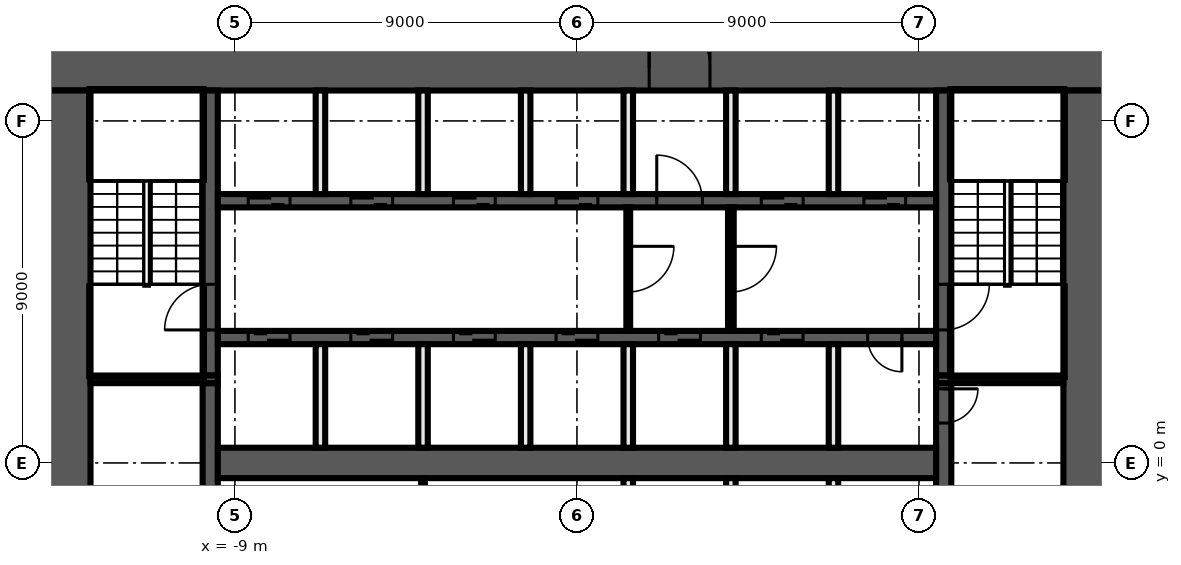
"""IFC4 building model, lengths in metres.
Left out: names, types, materials, properties, quantities, classifications, styles, units other than length and angle.
Written with IfcOpenShell. Run it as: python <this file> out.ifc"""

import sys

from ifc_helpers import new_model, si_unit, direction, frame, frame_2d, origin, place, context, subcontext, project, spatial, rectangle, extrude, element, fill, save


model = new_model("IFC4")
c1 = context("Model", 3, precision=1e-05, world=origin(), true_north=direction((0.0, 1.0)))
c2 = subcontext(c1, "Body", "Model", "MODEL_VIEW")
j1 = project(units=[si_unit("LENGTHUNIT", "METRE"), si_unit("PLANEANGLEUNIT", "RADIAN")], contexts=[c1])
p1 = place(None, origin())
s1 = spatial("IfcSite", under=j1, at=p1, CompositionType="ELEMENT")
p2 = place(p1, origin())
s2 = spatial("IfcBuilding", under=s1, at=p2, CompositionType="ELEMENT")
p3 = place(p2, frame((0.0, 0.0, 89.2)))
s3 = spatial("IfcBuildingStorey", under=s2, at=p3, CompositionType="ELEMENT", Elevation=89.2)
p4 = place(p3, frame((-14.0, 10.4, 0.0), z_axis=(0.0, 0.0, 1.0), x_axis=(1.0, 0.0, 0.0)))
e1 = element("IfcWall", 1, at=p4, inside=s3, PredefinedType="SHEAR", context=c2, shape_type="SweptSolid", body=[
    extrude(rectangle(XDim=28.0, YDim=1.2, at=frame_2d((14.0, 0.0))), origin(), (0.0, 0.0, 1.0), 5.55),
])
p5 = place(p4, frame((15.9, 0.0, 0.0)))
e2 = element("IfcOpeningElement", 2, at=p5, cuts=e1, PredefinedType="OPENING", context=c2, shape_type="SweptSolid", body=[
    extrude(rectangle(XDim=1.6, YDim=2.1, at=frame_2d((0.8, 1.05))), frame((0.0, 0.61, 0.0), z_axis=(0.0, -1.0, 0.0), x_axis=(1.0, 0.0, 0.0)), (0.0, 0.0, 1.0), 1.22),
])
for number, where, z_axis, x_axis in (
    (3, (13.4, 9.8, 0.0), (0.0, 0.0, 1.0), (0.0, -1.0, 0.0)),
    (4, (-13.4, -9.8, 0.0), (0.0, 0.0, 1.0), (0.0, 1.0, 0.0)),
):
    element("IfcWall", number, at=place(p3, frame(where, z_axis=z_axis, x_axis=x_axis)), inside=s3, PredefinedType="SHEAR", context=c2, shape_type="SweptSolid", body=[
        extrude(rectangle(XDim=19.6, YDim=1.2, at=frame_2d((9.8, 0.0))), origin(), (0.0, 0.0, 1.0), 5.55),
    ])
p6 = place(p3, frame((9.65, 2.1, 0.0), z_axis=(0.0, 0.0, 1.0), x_axis=(0.0, -1.0, 0.0)))
e5 = element("IfcWall", 5, at=p6, inside=s3, PredefinedType="SHEAR", context=c2, shape_type="SweptSolid", body=[
    extrude(rectangle(XDim=4.2, YDim=0.4, at=frame_2d((2.1, 0.0))), origin(), (0.0, 0.0, 1.0), 5.55),
])
p7 = place(p6, frame((0.15, 0.0, 0.0)))
e6 = element("IfcOpeningElement", 6, at=p7, cuts=e5, PredefinedType="OPENING", context=c2, shape_type="SweptSolid", body=[
    extrude(rectangle(XDim=0.9, YDim=2.1, at=frame_2d((0.45, 1.05))), frame((0.0, 0.21, 0.0), z_axis=(0.0, -1.0, 0.0), x_axis=(1.0, 0.0, 0.0)), (0.0, 0.0, 1.0), 0.42),
])
p8 = place(p3, frame((9.65, 9.8, 0.0), z_axis=(0.0, 0.0, 1.0), x_axis=(0.0, -1.0, 0.0)))
e7 = element("IfcWall", 7, at=p8, inside=s3, PredefinedType="SHEAR", context=c2, shape_type="SweptSolid", body=[
    extrude(rectangle(XDim=7.5, YDim=0.4, at=frame_2d((3.75, 0.0))), origin(), (0.0, 0.0, 1.0), 5.55),
])
p9 = place(p8, frame((5.1, 0.0, 0.0)))
e8 = element("IfcOpeningElement", 8, at=p9, cuts=e7, PredefinedType="OPENING", context=c2, shape_type="SweptSolid", body=[
    extrude(rectangle(XDim=1.2, YDim=2.1, at=frame_2d((0.6, 1.05))), frame((0.0, 0.21, 0.0), z_axis=(0.0, -1.0, 0.0), x_axis=(1.0, 0.0, 0.0)), (0.0, 0.0, 1.0), 0.42),
])
p10 = place(p3, frame((-9.65, -2.1, 0.0), z_axis=(0.0, 0.0, 1.0), x_axis=(0.0, 1.0, 0.0)))
e9 = element("IfcWall", 9, at=p10, inside=s3, PredefinedType="SHEAR", context=c2, shape_type="SweptSolid", body=[
    extrude(rectangle(XDim=4.2, YDim=0.4, at=frame_2d((2.1, 0.0))), origin(), (0.0, 0.0, 1.0), 5.55),
])
p11 = place(p3, frame((-9.65, 2.3, 0.0), z_axis=(0.0, 0.0, 1.0), x_axis=(0.0, 1.0, 0.0)))
e10 = element("IfcWall", 10, at=p11, inside=s3, PredefinedType="SHEAR", context=c2, shape_type="SweptSolid", body=[
    extrude(rectangle(XDim=7.5, YDim=0.4, at=frame_2d((3.75, 0.0))), origin(), (0.0, 0.0, 1.0), 5.55),
])
p12 = place(p11, frame((1.2, 0.0, 0.0)))
e11 = element("IfcOpeningElement", 11, at=p12, cuts=e10, PredefinedType="OPENING", context=c2, shape_type="SweptSolid", body=[
    extrude(rectangle(XDim=1.2, YDim=2.1, at=frame_2d((0.6, 1.05))), frame((0.0, 0.21, 0.0), z_axis=(0.0, -1.0, 0.0), x_axis=(1.0, 0.0, 0.0)), (0.0, 0.0, 1.0), 0.42),
])
for number, where, z_axis, x_axis in (
    (12, (9.45, 2.2, 0.0), (0.0, 0.0, 1.0), (1.0, 0.0, 0.0)),
    (13, (-9.45, 2.2, 0.0), (0.0, 0.0, 1.0), (-1.0, 0.0, 0.0)),
):
    element("IfcWall", number, at=place(p3, frame(where, z_axis=z_axis, x_axis=x_axis)), inside=s3, PredefinedType="SHEAR", context=c2, shape_type="SweptSolid", body=[
        extrude(rectangle(XDim=3.35, YDim=0.2, at=frame_2d((1.675, 0.0))), origin(), (0.0, 0.0, 1.0), 5.55),
    ])
p13 = place(p3, frame((-9.45, 6.9, 0.0), z_axis=(0.0, 0.0, 1.0), x_axis=(1.0, 0.0, 0.0)))
e14 = element("IfcWall", 14, at=p13, inside=s3, PredefinedType="SHEAR", context=c2, shape_type="SweptSolid", body=[
    extrude(rectangle(XDim=18.9, YDim=0.35, at=frame_2d((9.45, 0.0))), origin(), (0.0, 0.0, 1.0), 5.55),
])
p14 = place(p13, frame((0.8, 0.0, 0.0)))
e15 = element("IfcOpeningElement", 15, at=p14, cuts=e14, PredefinedType="OPENING", context=c2, shape_type="SweptSolid", body=[
    extrude(rectangle(XDim=1.1, YDim=2.1, at=frame_2d((0.55, 1.05))), frame((0.0, 0.185, 0.0), z_axis=(0.0, -1.0, 0.0), x_axis=(1.0, 0.0, 0.0)), (0.0, 0.0, 1.0), 0.37),
])
p15 = place(p13, frame((3.5, 0.0, 0.0)))
e16 = element("IfcOpeningElement", 16, at=p15, cuts=e14, PredefinedType="OPENING", context=c2, shape_type="SweptSolid", body=[
    extrude(rectangle(XDim=1.1, YDim=2.1, at=frame_2d((0.55, 1.05))), frame((0.0, 0.185, 0.0), z_axis=(0.0, -1.0, 0.0), x_axis=(1.0, 0.0, 0.0)), (0.0, 0.0, 1.0), 0.37),
])
p16 = place(p13, frame((6.2, 0.0, 0.0)))
e17 = element("IfcOpeningElement", 17, at=p16, cuts=e14, PredefinedType="OPENING", context=c2, shape_type="SweptSolid", body=[
    extrude(rectangle(XDim=1.1, YDim=2.1, at=frame_2d((0.55, 1.05))), frame((0.0, 0.185, 0.0), z_axis=(0.0, -1.0, 0.0), x_axis=(1.0, 0.0, 0.0)), (0.0, 0.0, 1.0), 0.37),
])
p17 = place(p13, frame((8.9, 0.0, 0.0)))
e18 = element("IfcOpeningElement", 18, at=p17, cuts=e14, PredefinedType="OPENING", context=c2, shape_type="SweptSolid", body=[
    extrude(rectangle(XDim=1.1, YDim=2.1, at=frame_2d((0.55, 1.05))), frame((0.0, 0.185, 0.0), z_axis=(0.0, -1.0, 0.0), x_axis=(1.0, 0.0, 0.0)), (0.0, 0.0, 1.0), 0.37),
])
p18 = place(p13, frame((11.55, 0.0, 0.0)))
e19 = element("IfcOpeningElement", 19, at=p18, cuts=e14, PredefinedType="OPENING", context=c2, shape_type="SweptSolid", body=[
    extrude(rectangle(XDim=1.2, YDim=2.1, at=frame_2d((0.6, 1.05))), frame((0.0, 0.185, 0.0), z_axis=(0.0, -1.0, 0.0), x_axis=(1.0, 0.0, 0.0)), (0.0, 0.0, 1.0), 0.37),
])
p19 = place(p13, frame((14.3, 0.0, 0.0)))
e20 = element("IfcOpeningElement", 20, at=p19, cuts=e14, PredefinedType="OPENING", context=c2, shape_type="SweptSolid", body=[
    extrude(rectangle(XDim=1.1, YDim=2.1, at=frame_2d((0.55, 1.05))), frame((0.0, 0.185, 0.0), z_axis=(0.0, -1.0, 0.0), x_axis=(1.0, 0.0, 0.0)), (0.0, 0.0, 1.0), 0.37),
])
p20 = place(p13, frame((17.0, 0.0, 0.0)))
e21 = element("IfcOpeningElement", 21, at=p20, cuts=e14, PredefinedType="OPENING", context=c2, shape_type="SweptSolid", body=[
    extrude(rectangle(XDim=1.1, YDim=2.1, at=frame_2d((0.55, 1.05))), frame((0.0, 0.185, 0.0), z_axis=(0.0, -1.0, 0.0), x_axis=(1.0, 0.0, 0.0)), (0.0, 0.0, 1.0), 0.37),
])
p21 = place(p3, frame((9.45, 3.3, 0.0), z_axis=(0.0, 0.0, 1.0), x_axis=(-1.0, 0.0, 0.0)))
e22 = element("IfcWall", 22, at=p21, inside=s3, PredefinedType="SHEAR", context=c2, shape_type="SweptSolid", body=[
    extrude(rectangle(XDim=18.9, YDim=0.35, at=frame_2d((9.45, 0.0))), origin(), (0.0, 0.0, 1.0), 5.55),
])
p22 = place(p21, frame((17.0, 0.0, 0.0)))
e23 = element("IfcOpeningElement", 23, at=p22, cuts=e22, PredefinedType="OPENING", context=c2, shape_type="SweptSolid", body=[
    extrude(rectangle(XDim=1.1, YDim=2.1, at=frame_2d((0.55, 1.05))), frame((0.0, 0.185, 0.0), z_axis=(0.0, -1.0, 0.0), x_axis=(1.0, 0.0, 0.0)), (0.0, 0.0, 1.0), 0.37),
])
p23 = place(p21, frame((14.3, 0.0, 0.0)))
e24 = element("IfcOpeningElement", 24, at=p23, cuts=e22, PredefinedType="OPENING", context=c2, shape_type="SweptSolid", body=[
    extrude(rectangle(XDim=1.1, YDim=2.1, at=frame_2d((0.55, 1.05))), frame((0.0, 0.185, 0.0), z_axis=(0.0, -1.0, 0.0), x_axis=(1.0, 0.0, 0.0)), (0.0, 0.0, 1.0), 0.37),
])
p24 = place(p21, frame((11.6, 0.0, 0.0)))
e25 = element("IfcOpeningElement", 25, at=p24, cuts=e22, PredefinedType="OPENING", context=c2, shape_type="SweptSolid", body=[
    extrude(rectangle(XDim=1.1, YDim=2.1, at=frame_2d((0.55, 1.05))), frame((0.0, 0.185, 0.0), z_axis=(0.0, -1.0, 0.0), x_axis=(1.0, 0.0, 0.0)), (0.0, 0.0, 1.0), 0.37),
])
p25 = place(p21, frame((8.9, 0.0, 0.0)))
e26 = element("IfcOpeningElement", 26, at=p25, cuts=e22, PredefinedType="OPENING", context=c2, shape_type="SweptSolid", body=[
    extrude(rectangle(XDim=1.1, YDim=2.1, at=frame_2d((0.55, 1.05))), frame((0.0, 0.185, 0.0), z_axis=(0.0, -1.0, 0.0), x_axis=(1.0, 0.0, 0.0)), (0.0, 0.0, 1.0), 0.37),
])
p26 = place(p21, frame((6.2, 0.0, 0.0)))
e27 = element("IfcOpeningElement", 27, at=p26, cuts=e22, PredefinedType="OPENING", context=c2, shape_type="SweptSolid", body=[
    extrude(rectangle(XDim=1.1, YDim=2.1, at=frame_2d((0.55, 1.05))), frame((0.0, 0.185, 0.0), z_axis=(0.0, -1.0, 0.0), x_axis=(1.0, 0.0, 0.0)), (0.0, 0.0, 1.0), 0.37),
])
p27 = place(p21, frame((3.5, 0.0, 0.0)))
e28 = element("IfcOpeningElement", 28, at=p27, cuts=e22, PredefinedType="OPENING", context=c2, shape_type="SweptSolid", body=[
    extrude(rectangle(XDim=1.1, YDim=2.1, at=frame_2d((0.55, 1.05))), frame((0.0, 0.185, 0.0), z_axis=(0.0, -1.0, 0.0), x_axis=(1.0, 0.0, 0.0)), (0.0, 0.0, 1.0), 0.37),
])
p28 = place(p21, frame((0.9, 0.0, 0.0)))
e29 = element("IfcOpeningElement", 29, at=p28, cuts=e22, PredefinedType="OPENING", context=c2, shape_type="SweptSolid", body=[
    extrude(rectangle(XDim=0.9, YDim=2.1, at=frame_2d((0.45, 1.05))), frame((0.0, 0.185, 0.0), z_axis=(0.0, -1.0, 0.0), x_axis=(1.0, 0.0, 0.0)), (0.0, 0.0, 1.0), 0.37),
])
p29 = place(p3, frame((-9.45, 0.0, 0.0), z_axis=(0.0, 0.0, 1.0), x_axis=(1.0, 0.0, 0.0)))
e30 = element("IfcWall", 30, at=p29, inside=s3, PredefinedType="SHEAR", context=c2, shape_type="SweptSolid", body=[
    extrude(rectangle(XDim=18.9, YDim=0.8, at=frame_2d((9.45, 0.0))), origin(), (0.0, 0.0, 1.0), 5.55),
])
for number, where, z_axis, x_axis in (
    (31, (6.75, -3.125, 0.0), (0.0, 0.0, 1.0), (0.0, 1.0, 0.0)),
    (32, (6.75, 0.4, 0.0), (0.0, 0.0, 1.0), (0.0, 1.0, 0.0)),
    (33, (6.75, 7.075, 0.0), (0.0, 0.0, 1.0), (0.0, 1.0, 0.0)),
):
    element("IfcWall", number, at=place(p3, frame(where, z_axis=z_axis, x_axis=x_axis)), inside=s3, PredefinedType="SOLIDWALL", context=c2, shape_type="SweptSolid", body=[
        extrude(rectangle(XDim=2.725, YDim=0.25, at=frame_2d((1.363, 0.0))), origin(), (0.0, 0.0, 1.0), 5.55),
    ])
p30 = place(p3, frame((4.05, 6.725, 0.0), z_axis=(0.0, 0.0, 1.0), x_axis=(0.0, -1.0, 0.0)))
e34 = element("IfcWall", 34, at=p30, inside=s3, PredefinedType="PARTITIONING", context=c2, shape_type="SweptSolid", body=[
    extrude(rectangle(XDim=3.25, YDim=0.15, at=frame_2d((1.625, 0.0))), origin(), (0.0, 0.0, 1.0), 5.55),
])
p31 = place(p30, frame((1.025, 0.0, 0.0)))
e35 = element("IfcOpeningElement", 35, at=p31, cuts=e34, PredefinedType="OPENING", context=c2, shape_type="SweptSolid", body=[
    extrude(rectangle(XDim=1.2, YDim=2.1, at=frame_2d((0.6, 1.05))), frame((0.0, 0.085, 0.0), z_axis=(0.0, -1.0, 0.0), x_axis=(1.0, 0.0, 0.0)), (0.0, 0.0, 1.0), 0.17),
])
for number, where, z_axis, x_axis in (
    (36, (4.05, -3.125, 0.0), (0.0, 0.0, 1.0), (0.0, 1.0, 0.0)),
    (37, (4.05, 0.4, 0.0), (0.0, 0.0, 1.0), (0.0, 1.0, 0.0)),
    (38, (4.05, 7.075, 0.0), (0.0, 0.0, 1.0), (0.0, 1.0, 0.0)),
):
    element("IfcWall", number, at=place(p3, frame(where, z_axis=z_axis, x_axis=x_axis)), inside=s3, PredefinedType="SOLIDWALL", context=c2, shape_type="SweptSolid", body=[
        extrude(rectangle(XDim=2.725, YDim=0.25, at=frame_2d((1.363, 0.0))), origin(), (0.0, 0.0, 1.0), 5.55),
    ])
p32 = place(p3, frame((1.35, 6.725, 0.0), z_axis=(0.0, 0.0, 1.0), x_axis=(0.0, -1.0, 0.0)))
e39 = element("IfcWall", 39, at=p32, inside=s3, PredefinedType="PARTITIONING", context=c2, shape_type="SweptSolid", body=[
    extrude(rectangle(XDim=3.25, YDim=0.1, at=frame_2d((1.625, 0.0))), origin(), (0.0, 0.0, 1.0), 5.55),
])
p33 = place(p32, frame((1.025, 0.0, 0.0)))
e40 = element("IfcOpeningElement", 40, at=p33, cuts=e39, PredefinedType="OPENING", context=c2, shape_type="SweptSolid", body=[
    extrude(rectangle(XDim=1.2, YDim=2.1, at=frame_2d((0.6, 1.05))), frame((0.0, 0.06, 0.0), z_axis=(0.0, -1.0, 0.0), x_axis=(1.0, 0.0, 0.0)), (0.0, 0.0, 1.0), 0.12),
])
for number, where, z_axis, x_axis in (
    (41, (1.35, -3.125, 0.0), (0.0, 0.0, 1.0), (0.0, 1.0, 0.0)),
    (42, (1.35, 0.4, 0.0), (0.0, 0.0, 1.0), (0.0, 1.0, 0.0)),
    (43, (1.35, 7.075, 0.0), (0.0, 0.0, 1.0), (0.0, 1.0, 0.0)),
    (44, (-1.35, 0.4, 0.0), (0.0, 0.0, 1.0), (0.0, 1.0, 0.0)),
    (45, (-1.35, 7.075, 0.0), (0.0, 0.0, 1.0), (0.0, 1.0, 0.0)),
):
    element("IfcWall", number, at=place(p3, frame(where, z_axis=z_axis, x_axis=x_axis)), inside=s3, PredefinedType="SOLIDWALL", context=c2, shape_type="SweptSolid", body=[
        extrude(rectangle(XDim=2.725, YDim=0.25, at=frame_2d((1.363, 0.0))), origin(), (0.0, 0.0, 1.0), 5.55),
    ])
p34 = place(p3, frame((-4.05, -3.125, 0.0), z_axis=(0.0, 0.0, 1.0), x_axis=(0.0, 1.0, 0.0)))
e46 = element("IfcWall", 46, at=p34, inside=s3, PredefinedType="PARTITIONING", context=c2, shape_type="SweptSolid", body=[
    extrude(rectangle(XDim=2.725, YDim=0.1, at=frame_2d((1.363, 0.0))), origin(), (0.0, 0.0, 1.0), 5.55),
])
for number, where, z_axis, x_axis in (
    (47, (-4.05, 0.4, 0.0), (0.0, 0.0, 1.0), (0.0, 1.0, 0.0)),
    (48, (-4.05, 7.075, 0.0), (0.0, 0.0, 1.0), (0.0, 1.0, 0.0)),
    (49, (-6.75, 0.4, 0.0), (0.0, 0.0, 1.0), (0.0, 1.0, 0.0)),
    (50, (-6.75, 7.075, 0.0), (0.0, 0.0, 1.0), (0.0, 1.0, 0.0)),
):
    element("IfcWall", number, at=place(p3, frame(where, z_axis=z_axis, x_axis=x_axis)), inside=s3, PredefinedType="SOLIDWALL", context=c2, shape_type="SweptSolid", body=[
        extrude(rectangle(XDim=2.725, YDim=0.25, at=frame_2d((1.363, 0.0))), origin(), (0.0, 0.0, 1.0), 5.55),
    ])
p35 = place(p7, origin())
e51 = element("IfcDoor", 51, at=p35, inside=s3, OperationType="SINGLE_SWING_RIGHT", PredefinedType="DOOR", context=c2, shape_type="SweptSolid", body=[
    extrude(rectangle(XDim=0.9, YDim=2.1, at=frame_2d((0.45, 1.05))), frame((0.0, 0.025, 0.0), z_axis=(0.0, -1.0, 0.0), x_axis=(1.0, 0.0, 0.0)), (0.0, 0.0, 1.0), 0.05),
])
fill(e6, e51)
p36 = place(p14, origin())
e52 = element("IfcDoor", 52, at=p36, inside=s3, OperationType="DOUBLE_DOOR_SLIDING", PredefinedType="DOOR", context=c2, shape_type="SweptSolid", body=[
    extrude(rectangle(XDim=1.1, YDim=2.1, at=frame_2d((0.55, 1.05))), frame((0.0, 0.025, 0.0), z_axis=(0.0, -1.0, 0.0), x_axis=(1.0, 0.0, 0.0)), (0.0, 0.0, 1.0), 0.05),
])
fill(e15, e52)
p37 = place(p15, origin())
e53 = element("IfcDoor", 53, at=p37, inside=s3, OperationType="DOUBLE_DOOR_SLIDING", PredefinedType="DOOR", context=c2, shape_type="SweptSolid", body=[
    extrude(rectangle(XDim=1.1, YDim=2.1, at=frame_2d((0.55, 1.05))), frame((0.0, 0.025, 0.0), z_axis=(0.0, -1.0, 0.0), x_axis=(1.0, 0.0, 0.0)), (0.0, 0.0, 1.0), 0.05),
])
fill(e16, e53)
p38 = place(p16, origin())
e54 = element("IfcDoor", 54, at=p38, inside=s3, OperationType="DOUBLE_DOOR_SLIDING", PredefinedType="DOOR", context=c2, shape_type="SweptSolid", body=[
    extrude(rectangle(XDim=1.1, YDim=2.1, at=frame_2d((0.55, 1.05))), frame((0.0, 0.025, 0.0), z_axis=(0.0, -1.0, 0.0), x_axis=(1.0, 0.0, 0.0)), (0.0, 0.0, 1.0), 0.05),
])
fill(e17, e54)
p39 = place(p17, origin())
e55 = element("IfcDoor", 55, at=p39, inside=s3, OperationType="DOUBLE_DOOR_SLIDING", PredefinedType="DOOR", context=c2, shape_type="SweptSolid", body=[
    extrude(rectangle(XDim=1.1, YDim=2.1, at=frame_2d((0.55, 1.05))), frame((0.0, 0.025, 0.0), z_axis=(0.0, -1.0, 0.0), x_axis=(1.0, 0.0, 0.0)), (0.0, 0.0, 1.0), 0.05),
])
fill(e18, e55)
p40 = place(p5, origin())
e56 = element("IfcDoor", 56, at=p40, inside=s3, OperationType="DOUBLE_DOOR_SINGLE_SWING", PredefinedType="DOOR", context=c2, shape_type="SweptSolid", body=[
    extrude(rectangle(XDim=1.6, YDim=2.1, at=frame_2d((0.8, 1.05))), frame((0.0, 0.025, 0.0), z_axis=(0.0, -1.0, 0.0), x_axis=(1.0, 0.0, 0.0)), (0.0, 0.0, 1.0), 0.05),
])
fill(e2, e56)
p41 = place(p18, origin())
e57 = element("IfcDoor", 57, at=p41, inside=s3, OperationType="SINGLE_SWING_LEFT", PredefinedType="DOOR", context=c2, shape_type="SweptSolid", body=[
    extrude(rectangle(XDim=1.2, YDim=2.1, at=frame_2d((0.6, 1.05))), frame((0.0, 0.025, 0.0), z_axis=(0.0, -1.0, 0.0), x_axis=(1.0, 0.0, 0.0)), (0.0, 0.0, 1.0), 0.05),
])
fill(e19, e57)
p42 = place(p19, origin())
e58 = element("IfcDoor", 58, at=p42, inside=s3, OperationType="DOUBLE_DOOR_SLIDING", PredefinedType="DOOR", context=c2, shape_type="SweptSolid", body=[
    extrude(rectangle(XDim=1.1, YDim=2.1, at=frame_2d((0.55, 1.05))), frame((0.0, 0.025, 0.0), z_axis=(0.0, -1.0, 0.0), x_axis=(1.0, 0.0, 0.0)), (0.0, 0.0, 1.0), 0.05),
])
fill(e20, e58)
p43 = place(p20, origin())
e59 = element("IfcDoor", 59, at=p43, inside=s3, OperationType="DOUBLE_DOOR_SLIDING", PredefinedType="DOOR", context=c2, shape_type="SweptSolid", body=[
    extrude(rectangle(XDim=1.1, YDim=2.1, at=frame_2d((0.55, 1.05))), frame((0.0, 0.025, 0.0), z_axis=(0.0, -1.0, 0.0), x_axis=(1.0, 0.0, 0.0)), (0.0, 0.0, 1.0), 0.05),
])
fill(e21, e59)
p44 = place(p22, origin())
e60 = element("IfcDoor", 60, at=p44, inside=s3, OperationType="DOUBLE_DOOR_SLIDING", PredefinedType="DOOR", context=c2, shape_type="SweptSolid", body=[
    extrude(rectangle(XDim=1.1, YDim=2.1, at=frame_2d((0.55, 1.05))), frame((0.0, 0.025, 0.0), z_axis=(0.0, -1.0, 0.0), x_axis=(1.0, 0.0, 0.0)), (0.0, 0.0, 1.0), 0.05),
])
fill(e23, e60)
p45 = place(p23, origin())
e61 = element("IfcDoor", 61, at=p45, inside=s3, OperationType="DOUBLE_DOOR_SLIDING", PredefinedType="DOOR", context=c2, shape_type="SweptSolid", body=[
    extrude(rectangle(XDim=1.1, YDim=2.1, at=frame_2d((0.55, 1.05))), frame((0.0, 0.025, 0.0), z_axis=(0.0, -1.0, 0.0), x_axis=(1.0, 0.0, 0.0)), (0.0, 0.0, 1.0), 0.05),
])
fill(e24, e61)
p46 = place(p24, origin())
e62 = element("IfcDoor", 62, at=p46, inside=s3, OperationType="DOUBLE_DOOR_SLIDING", PredefinedType="DOOR", context=c2, shape_type="SweptSolid", body=[
    extrude(rectangle(XDim=1.1, YDim=2.1, at=frame_2d((0.55, 1.05))), frame((0.0, 0.025, 0.0), z_axis=(0.0, -1.0, 0.0), x_axis=(1.0, 0.0, 0.0)), (0.0, 0.0, 1.0), 0.05),
])
fill(e25, e62)
p47 = place(p25, origin())
e63 = element("IfcDoor", 63, at=p47, inside=s3, OperationType="DOUBLE_DOOR_SLIDING", PredefinedType="DOOR", context=c2, shape_type="SweptSolid", body=[
    extrude(rectangle(XDim=1.1, YDim=2.1, at=frame_2d((0.55, 1.05))), frame((0.0, 0.025, 0.0), z_axis=(0.0, -1.0, 0.0), x_axis=(1.0, 0.0, 0.0)), (0.0, 0.0, 1.0), 0.05),
])
fill(e26, e63)
p48 = place(p26, origin())
e64 = element("IfcDoor", 64, at=p48, inside=s3, OperationType="DOUBLE_DOOR_SLIDING", PredefinedType="DOOR", context=c2, shape_type="SweptSolid", body=[
    extrude(rectangle(XDim=1.1, YDim=2.1, at=frame_2d((0.55, 1.05))), frame((0.0, 0.025, 0.0), z_axis=(0.0, -1.0, 0.0), x_axis=(1.0, 0.0, 0.0)), (0.0, 0.0, 1.0), 0.05),
])
fill(e27, e64)
p49 = place(p27, origin())
e65 = element("IfcDoor", 65, at=p49, inside=s3, OperationType="DOUBLE_DOOR_SLIDING", PredefinedType="DOOR", context=c2, shape_type="SweptSolid", body=[
    extrude(rectangle(XDim=1.1, YDim=2.1, at=frame_2d((0.55, 1.05))), frame((0.0, 0.025, 0.0), z_axis=(0.0, -1.0, 0.0), x_axis=(1.0, 0.0, 0.0)), (0.0, 0.0, 1.0), 0.05),
])
fill(e28, e65)
p50 = place(p28, origin())
e66 = element("IfcDoor", 66, at=p50, inside=s3, OperationType="SINGLE_SWING_LEFT", PredefinedType="DOOR", context=c2, shape_type="SweptSolid", body=[
    extrude(rectangle(XDim=0.9, YDim=2.1, at=frame_2d((0.45, 1.05))), frame((0.0, 0.025, 0.0), z_axis=(0.0, -1.0, 0.0), x_axis=(1.0, 0.0, 0.0)), (0.0, 0.0, 1.0), 0.05),
])
fill(e29, e66)
p51 = place(p9, origin())
e67 = element("IfcDoor", 67, at=p51, inside=s3, OperationType="SINGLE_SWING_LEFT", PredefinedType="DOOR", context=c2, shape_type="SweptSolid", body=[
    extrude(rectangle(XDim=1.2, YDim=2.1, at=frame_2d((0.6, 1.05))), frame((0.0, 0.025, 0.0), z_axis=(0.0, -1.0, 0.0), x_axis=(1.0, 0.0, 0.0)), (0.0, 0.0, 1.0), 0.05),
])
fill(e8, e67)
p52 = place(p12, origin())
e68 = element("IfcDoor", 68, at=p52, inside=s3, OperationType="SINGLE_SWING_RIGHT", PredefinedType="DOOR", context=c2, shape_type="SweptSolid", body=[
    extrude(rectangle(XDim=1.2, YDim=2.1, at=frame_2d((0.6, 1.05))), frame((0.0, 0.025, 0.0), z_axis=(0.0, -1.0, 0.0), x_axis=(1.0, 0.0, 0.0)), (0.0, 0.0, 1.0), 0.05),
])
fill(e11, e68)
p53 = place(p33, origin())
e69 = element("IfcDoor", 69, at=p53, inside=s3, OperationType="SINGLE_SWING_LEFT", PredefinedType="DOOR", context=c2, shape_type="SweptSolid", body=[
    extrude(rectangle(XDim=1.2, YDim=2.1, at=frame_2d((0.6, 1.05))), frame((0.0, 0.025, 0.0), z_axis=(0.0, -1.0, 0.0), x_axis=(1.0, 0.0, 0.0)), (0.0, 0.0, 1.0), 0.05),
])
fill(e40, e69)
p54 = place(p31, origin())
e70 = element("IfcDoor", 70, at=p54, inside=s3, OperationType="SINGLE_SWING_RIGHT", PredefinedType="DOOR", context=c2, shape_type="SweptSolid", body=[
    extrude(rectangle(XDim=1.2, YDim=2.1, at=frame_2d((0.6, 1.05))), frame((0.0, 0.025, 0.0), z_axis=(0.0, -1.0, 0.0), x_axis=(1.0, 0.0, 0.0)), (0.0, 0.0, 1.0), 0.05),
])
fill(e35, e70)
save(model, sys.argv[1])
